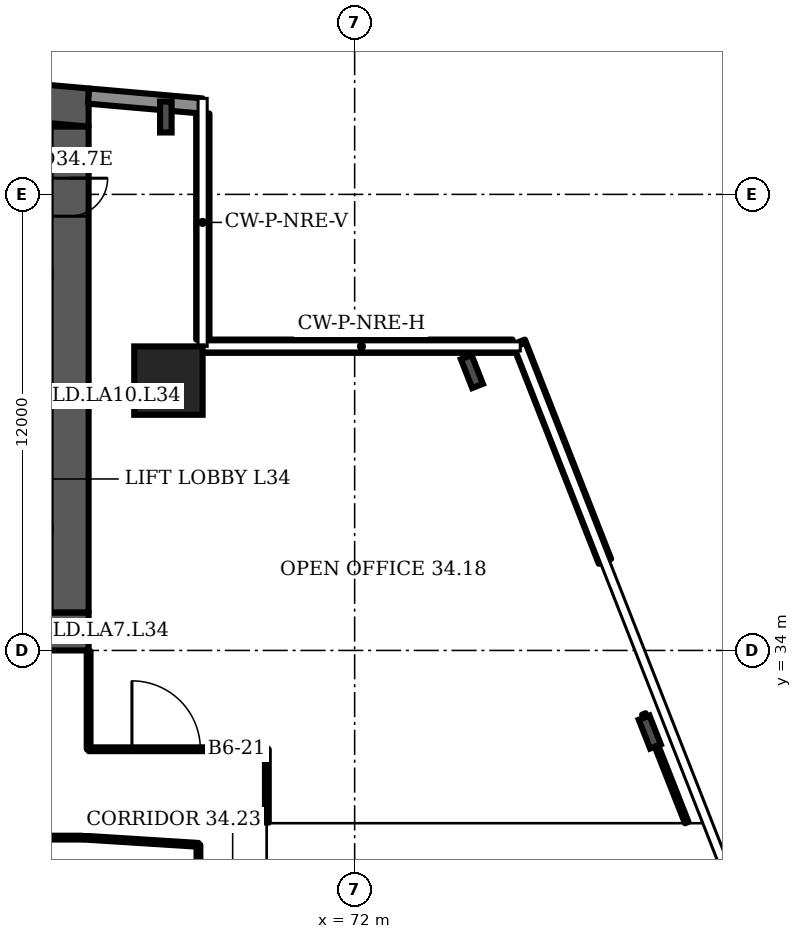
"""IFC4 building model, lengths in metres.
Left out: names, types, materials, properties, quantities, classifications, styles, units other than length and angle.
Written with IfcOpenShell. Run it as: python <this file> out.ifc"""

import sys

from ifc_helpers import new_model, si_unit, direction, frame, frame_2d, origin, origin_2d, place, context, subcontext, project, spatial, polyline, rectangle, i_section, outline, extrude, element, fill, save


model = new_model("IFC4")
c1 = context("Model", 3, precision=1e-05, world=origin(), true_north=direction((0.0, 1.0)))
c2 = subcontext(c1, "Body", "Model", "MODEL_VIEW")
j1 = project(units=[si_unit("LENGTHUNIT", "METRE"), si_unit("PLANEANGLEUNIT", "RADIAN")], contexts=[c1])
p1 = place(None, origin())
s1 = spatial("IfcSite", under=j1, at=p1, CompositionType="ELEMENT")
p2 = place(p1, origin())
s2 = spatial("IfcBuilding", under=s1, at=p2, CompositionType="ELEMENT")
p3 = place(p2, frame((0.0, 0.0, 143.5)))
s3 = spatial("IfcBuildingStorey", under=s2, at=p3, CompositionType="ELEMENT", Elevation=143.5)
p4 = place(p3, origin())
e1 = element("IfcWall", 1, at=p4, inside=s3, PredefinedType="SHEAR", context=c2, shape_type="SweptSolid", body=[
    extrude(outline(polyline([(16.0, 47.784), (40.5, 49.927), (65.0, 47.784), (65.0, 48.787), (40.5, 50.931), (16.0, 48.787), (16.0, 47.784)])), origin(), (0.0, 0.0, 1.0), 3.6),
])
p5 = place(p3, frame((16.0, 34.5, 0.0), z_axis=(0.0, 0.0, 1.0), x_axis=(1.0, 0.0, 0.0)))
e2 = element("IfcWall", 2, at=p5, inside=s3, PredefinedType="SHEAR", context=c2, shape_type="SweptSolid", body=[
    extrude(rectangle(XDim=49.0, YDim=1.0, at=frame_2d((24.5, 0.0))), origin(), (0.0, 0.0, 1.0), 3.6),
])
p6 = place(p5, frame((1.2, 0.0, 0.0)))
e3 = element("IfcOpeningElement", 3, at=p6, cuts=e2, PredefinedType="OPENING", context=c2, shape_type="SweptSolid", body=[
    extrude(rectangle(XDim=1.1, YDim=2.1, at=frame_2d((0.55, 1.05))), frame((0.0, 0.51, 0.0), z_axis=(0.0, -1.0, 0.0), x_axis=(1.0, 0.0, 0.0)), (0.0, 0.0, 1.0), 1.02),
])
p7 = place(p5, frame((5.083, 0.0, 0.0)))
e4 = element("IfcOpeningElement", 4, at=p7, cuts=e2, PredefinedType="OPENING", context=c2, shape_type="SweptSolid", body=[
    extrude(rectangle(XDim=1.1, YDim=2.1, at=frame_2d((0.55, 1.05))), frame((0.0, 0.51, 0.0), z_axis=(0.0, -1.0, 0.0), x_axis=(1.0, 0.0, 0.0)), (0.0, 0.0, 1.0), 1.02),
])
p8 = place(p5, frame((2.933, 0.0, 0.0)))
e5 = element("IfcOpeningElement", 5, at=p8, cuts=e2, PredefinedType="OPENING", context=c2, shape_type="SweptSolid", body=[
    extrude(rectangle(XDim=1.4, YDim=2.1, at=frame_2d((0.7, 1.05))), frame((0.0, 0.51, 0.0), z_axis=(0.0, -1.0, 0.0), x_axis=(1.0, 0.0, 0.0)), (0.0, 0.0, 1.0), 1.02),
])
p9 = place(p5, frame((7.65, 0.0, 0.0)))
e6 = element("IfcOpeningElement", 6, at=p9, cuts=e2, PredefinedType="OPENING", context=c2, shape_type="SweptSolid", body=[
    extrude(rectangle(XDim=1.2, YDim=2.1, at=frame_2d((0.6, 1.05))), frame((0.0, 0.51, 0.0), z_axis=(0.0, -1.0, 0.0), x_axis=(1.0, 0.0, 0.0)), (0.0, 0.0, 1.0), 1.02),
])
p10 = place(p5, frame((14.817, 0.0, 0.0)))
e7 = element("IfcOpeningElement", 7, at=p10, cuts=e2, PredefinedType="OPENING", context=c2, shape_type="SweptSolid", body=[
    extrude(rectangle(XDim=1.1, YDim=2.1, at=frame_2d((0.55, 1.05))), frame((0.0, 0.51, 0.0), z_axis=(0.0, -1.0, 0.0), x_axis=(1.0, 0.0, 0.0)), (0.0, 0.0, 1.0), 1.02),
])
p11 = place(p5, frame((19.083, 0.0, 0.0)))
e8 = element("IfcOpeningElement", 8, at=p11, cuts=e2, PredefinedType="OPENING", context=c2, shape_type="SweptSolid", body=[
    extrude(rectangle(XDim=1.1, YDim=2.1, at=frame_2d((0.55, 1.05))), frame((0.0, 0.51, 0.0), z_axis=(0.0, -1.0, 0.0), x_axis=(1.0, 0.0, 0.0)), (0.0, 0.0, 1.0), 1.02),
])
p12 = place(p5, frame((16.8, 0.0, 0.0)))
e9 = element("IfcOpeningElement", 9, at=p12, cuts=e2, PredefinedType="OPENING", context=c2, shape_type="SweptSolid", body=[
    extrude(rectangle(XDim=1.4, YDim=2.1, at=frame_2d((0.7, 1.05))), frame((0.0, 0.51, 0.0), z_axis=(0.0, -1.0, 0.0), x_axis=(1.0, 0.0, 0.0)), (0.0, 0.0, 1.0), 1.02),
])
p13 = place(p5, frame((21.817, 0.0, 0.0)))
e10 = element("IfcOpeningElement", 10, at=p13, cuts=e2, PredefinedType="OPENING", context=c2, shape_type="SweptSolid", body=[
    extrude(rectangle(XDim=1.1, YDim=2.1, at=frame_2d((0.55, 1.05))), frame((0.0, 0.51, 0.0), z_axis=(0.0, -1.0, 0.0), x_axis=(1.0, 0.0, 0.0)), (0.0, 0.0, 1.0), 1.02),
])
p14 = place(p5, frame((26.083, 0.0, 0.0)))
e11 = element("IfcOpeningElement", 11, at=p14, cuts=e2, PredefinedType="OPENING", context=c2, shape_type="SweptSolid", body=[
    extrude(rectangle(XDim=1.1, YDim=2.1, at=frame_2d((0.55, 1.05))), frame((0.0, 0.51, 0.0), z_axis=(0.0, -1.0, 0.0), x_axis=(1.0, 0.0, 0.0)), (0.0, 0.0, 1.0), 1.02),
])
p15 = place(p5, frame((33.15, 0.0, 0.0)))
e12 = element("IfcOpeningElement", 12, at=p15, cuts=e2, PredefinedType="OPENING", context=c2, shape_type="SweptSolid", body=[
    extrude(rectangle(XDim=1.2, YDim=2.1, at=frame_2d((0.6, 1.05))), frame((0.0, 0.51, 0.0), z_axis=(0.0, -1.0, 0.0), x_axis=(1.0, 0.0, 0.0)), (0.0, 0.0, 1.0), 1.02),
])
p16 = place(p5, frame((37.8, 0.0, 0.0)))
e13 = element("IfcOpeningElement", 13, at=p16, cuts=e2, PredefinedType="OPENING", context=c2, shape_type="SweptSolid", body=[
    extrude(rectangle(XDim=1.4, YDim=2.1, at=frame_2d((0.7, 1.05))), frame((0.0, 0.51, 0.0), z_axis=(0.0, -1.0, 0.0), x_axis=(1.0, 0.0, 0.0)), (0.0, 0.0, 1.0), 1.02),
])
p17 = place(p5, frame((42.817, 0.0, 0.0)))
e14 = element("IfcOpeningElement", 14, at=p17, cuts=e2, PredefinedType="OPENING", context=c2, shape_type="SweptSolid", body=[
    extrude(rectangle(XDim=1.1, YDim=2.1, at=frame_2d((0.55, 1.05))), frame((0.0, 0.51, 0.0), z_axis=(0.0, -1.0, 0.0), x_axis=(1.0, 0.0, 0.0)), (0.0, 0.0, 1.0), 1.02),
])
p18 = place(p5, frame((46.7, 0.0, 0.0)))
e15 = element("IfcOpeningElement", 15, at=p18, cuts=e2, PredefinedType="OPENING", context=c2, shape_type="SweptSolid", body=[
    extrude(rectangle(XDim=1.1, YDim=2.1, at=frame_2d((0.55, 1.05))), frame((0.0, 0.51, 0.0), z_axis=(0.0, -1.0, 0.0), x_axis=(1.0, 0.0, 0.0)), (0.0, 0.0, 1.0), 1.02),
])
p19 = place(p5, frame((44.667, 0.0, 0.0)))
e16 = element("IfcOpeningElement", 16, at=p19, cuts=e2, PredefinedType="OPENING", context=c2, shape_type="SweptSolid", body=[
    extrude(rectangle(XDim=1.4, YDim=2.1, at=frame_2d((0.7, 1.05))), frame((0.0, 0.51, 0.0), z_axis=(0.0, -1.0, 0.0), x_axis=(1.0, 0.0, 0.0)), (0.0, 0.0, 1.0), 1.02),
])
p20 = place(p3, frame((64.5, 35.0, 0.0), z_axis=(0.0, 0.0, 1.0), x_axis=(0.0, 1.0, 0.0)))
e17 = element("IfcWall", 17, at=p20, inside=s3, PredefinedType="SHEAR", context=c2, shape_type="SweptSolid", body=[
    extrude(rectangle(XDim=12.784, YDim=1.0, at=frame_2d((6.392, 0.0))), origin(), (0.0, 0.0, 1.0), 3.6),
])
p21 = place(p20, frame((10.426, 0.0, 0.0)))
e18 = element("IfcOpeningElement", 18, at=p21, cuts=e17, PredefinedType="OPENING", context=c2, shape_type="SweptSolid", body=[
    extrude(rectangle(XDim=1.0, YDim=2.1, at=frame_2d((0.5, 1.05))), frame((0.0, 0.51, 0.0), z_axis=(0.0, -1.0, 0.0), x_axis=(1.0, 0.0, 0.0)), (0.0, 0.0, 1.0), 1.02),
])
p22 = place(p3, frame((67.1, 41.1, 0.0), z_axis=(0.0, 0.0, 1.0), x_axis=(1.0, 0.0, 0.0)))
e19 = element("IfcColumn", 19, at=p22, inside=s3, PredefinedType="COLUMN", context=c2, shape_type="SweptSolid", body=[
    extrude(rectangle(XDim=1.8, YDim=1.8, at=origin_2d()), origin(), (0.0, 0.0, 1.0), 3.6),
])
for number, where, z_axis, x_axis in (
    (20, (79.766, 31.853, 0.0), (0.0, 0.0, 1.0), (0.931, 0.366, 0.0)),
    (21, (75.085, 41.338, 0.0), (0.0, 0.0, 1.0), (0.931, 0.366, 0.0)),
    (22, (67.032, 48.036, 0.0), (0.0, 0.0, 1.0), (1.0, 0.0, 0.0)),
):
    element("IfcColumn", number, at=place(p3, frame(where, z_axis=z_axis, x_axis=x_axis)), inside=s3, PredefinedType="COLUMN", context=c2, shape_type="SweptSolid", body=[
        extrude(i_section(OverallWidth=0.303, OverallDepth=0.814, WebThickness=0.021, FlangeThickness=0.04, FilletRadius=0.03, at=origin_2d()), origin(), (0.0, 0.0, 1.0), 3.6),
    ])
p23 = place(p3, frame((67.983, 48.326, 0.0), z_axis=(0.0, 0.0, 1.0), x_axis=(-0.996194, 0.087168, 0.0)))
e23 = element("IfcWall", 23, at=p23, inside=s3, PredefinedType="SOLIDWALL", context=c2, shape_type="SweptSolid", body=[
    extrude(rectangle(XDim=2.994, YDim=0.4, at=frame_2d((1.497, 0.0))), origin(), (0.0, 0.0, 1.0), 3.15),
])
p24 = place(p3, frame((78.586, 36.344, 0.0), z_axis=(0.0, 0.0, 1.0), x_axis=(-0.365792, 0.930699, 0.0)))
e24 = element("IfcWall", 24, at=p24, inside=s3, PredefinedType="SOLIDWALL", context=c2, shape_type="SweptSolid", body=[
    extrude(rectangle(XDim=6.202, YDim=0.35, at=frame_2d((3.101, 0.0))), origin(), (0.0, 0.0, 1.0), 1.0),
])
p25 = place(p3, frame((76.155, 42.005, 0.0), z_axis=(0.0, 0.0, 1.0), x_axis=(-1.0, 0.0, 0.0)))
e25 = element("IfcWall", 25, at=p25, inside=s3, PredefinedType="SOLIDWALL", context=c2, shape_type="SweptSolid", body=[
    extrude(rectangle(XDim=8.155, YDim=0.35, at=frame_2d((4.078, 0.0))), origin(), (0.0, 0.0, 1.0), 1.0),
])
p26 = place(p3, frame((68.005, 42.18, 0.0), z_axis=(0.0, 0.0, 1.0), x_axis=(0.0, 1.0, 0.0)))
e26 = element("IfcWall", 26, at=p26, inside=s3, PredefinedType="SOLIDWALL", context=c2, shape_type="SweptSolid", body=[
    extrude(rectangle(XDim=5.947, YDim=0.35, at=frame_2d((2.973, 0.0))), origin(), (0.0, 0.0, 1.0), 1.0),
])
p27 = place(p3, frame((63.575, 29.075, 0.0), z_axis=(0.0, 0.0, 1.0), x_axis=(1.0, 0.0, 0.0)))
e27 = element("IfcWall", 27, at=p27, inside=s3, PredefinedType="PARTITIONING", context=c2, shape_type="SweptSolid", body=[
    extrude(rectangle(XDim=1.285, YDim=0.1, at=frame_2d((0.643, 0.0))), origin(), (0.0, 0.0, 1.0), 3.15),
])
p28 = place(p3, frame((65.0, 31.4, 0.0), z_axis=(0.0, 0.0, 1.0), x_axis=(0.0, 1.0, 0.0)))
e28 = element("IfcWall", 28, at=p28, inside=s3, PredefinedType="PARTITIONING", context=c2, shape_type="SweptSolid", body=[
    extrude(rectangle(XDim=2.58, YDim=0.1, at=frame_2d((1.29, 0.0))), origin(), (0.0, 0.0, 1.0), 3.15),
])
p29 = place(p3, frame((65.0, 31.4, 0.0), z_axis=(0.0, 0.0, 1.0), x_axis=(1.0, 0.0, 0.0)))
e29 = element("IfcWall", 29, at=p29, inside=s3, PredefinedType="PARTITIONING", context=c2, shape_type="SweptSolid", body=[
    extrude(rectangle(XDim=4.69, YDim=0.1, at=frame_2d((2.345, 0.0))), origin(), (0.0, 0.0, 1.0), 3.15),
])
p30 = place(p29, frame((1.14, 0.0, 0.0)))
e30 = element("IfcOpeningElement", 30, at=p30, cuts=e29, PredefinedType="OPENING", context=c2, shape_type="SweptSolid", body=[
    extrude(rectangle(XDim=1.8, YDim=2.1, at=frame_2d((0.9, 1.05))), frame((0.0, 0.06, 0.0), z_axis=(0.0, -1.0, 0.0), x_axis=(1.0, 0.0, 0.0)), (0.0, 0.0, 1.0), 0.12),
])
p31 = place(p3, frame((67.89, 24.65, 0.0), z_axis=(0.0, 0.0, 1.0), x_axis=(0.0, 1.0, 0.0)))
e31 = element("IfcWall", 31, at=p31, inside=s3, PredefinedType="PARTITIONING", context=c2, shape_type="SweptSolid", body=[
    extrude(rectangle(XDim=4.235, YDim=0.1, at=frame_2d((2.118, 0.0))), origin(), (0.0, 0.0, 1.0), 3.15),
])
p32 = place(p3, frame((67.89, 28.885, 0.0), z_axis=(0.0, 0.0, 1.0), x_axis=(-0.998031, 0.062786, 0.0)))
e32 = element("IfcWall", 32, at=p32, inside=s3, PredefinedType="PARTITIONING", context=c2, shape_type="SweptSolid", body=[
    extrude(rectangle(XDim=3.021, YDim=0.1, at=frame_2d((1.511, 0.0))), origin(), (0.0, 0.0, 1.0), 3.15),
])
p33 = place(p3, frame((69.69, 29.47, 0.0), z_axis=(0.0, 0.0, 1.0), x_axis=(0.0, 1.0, 0.0)))
e33 = element("IfcWall", 33, at=p33, inside=s3, PredefinedType="PARTITIONING", context=c2, shape_type="SweptSolid", body=[
    extrude(rectangle(XDim=1.93, YDim=0.1, at=frame_2d((0.965, 0.0))), origin(), (0.0, 0.0, 1.0), 3.15),
])
p34 = place(p3, frame((80.737, 29.47, 0.0), z_axis=(0.0, 0.0, 1.0), x_axis=(-0.366592, 0.930378, 0.0)))
e34 = element("IfcWall", 34, at=p34, inside=s3, PredefinedType="PARTITIONING", context=c2, shape_type="SweptSolid", body=[
    extrude(rectangle(XDim=3.074, YDim=0.1, at=frame_2d((1.537, 0.0))), origin(), (0.0, 0.0, 1.0), 2.53),
])
p35 = place(p21, origin())
e35 = element("IfcDoor", 35, at=p35, inside=s3, OperationType="SINGLE_SWING_RIGHT", PredefinedType="DOOR", context=c2, shape_type="SweptSolid", body=[
    extrude(rectangle(XDim=1.0, YDim=2.1, at=frame_2d((0.5, 1.05))), frame((0.0, 0.5, 0.0), z_axis=(0.0, -1.0, 0.0), x_axis=(1.0, 0.0, 0.0)), (0.0, 0.0, 1.0), 1.0),
])
fill(e18, e35)
p36 = place(p30, origin())
e36 = element("IfcDoor", 36, at=p36, inside=s3, OperationType="DOUBLE_DOOR_SINGLE_SWING", PredefinedType="DOOR", context=c2, shape_type="SweptSolid", body=[
    extrude(rectangle(XDim=1.8, YDim=2.1, at=frame_2d((0.9, 1.05))), frame((0.0, 0.025, 0.0), z_axis=(0.0, -1.0, 0.0), x_axis=(1.0, 0.0, 0.0)), (0.0, 0.0, 1.0), 0.05),
])
fill(e30, e36)
save(model, sys.argv[1])
